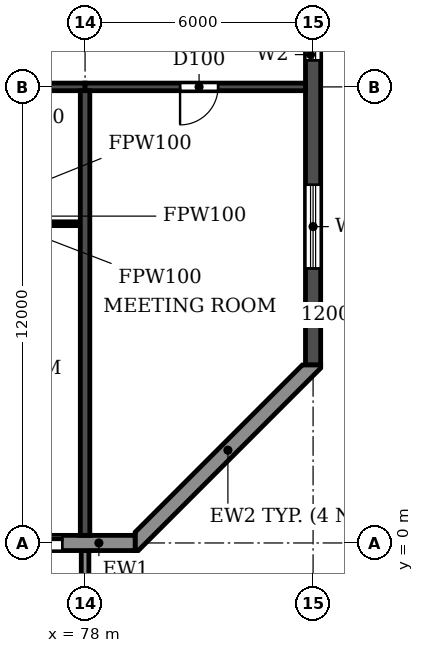
"""IFC4 building model, lengths in metres.
Left out: names, types, materials, properties, quantities, classifications, styles, units other than length and angle.
Written with IfcOpenShell. Run it as: python <this file> out.ifc"""

import sys

from ifc_helpers import new_model, si_unit, direction, frame, frame_2d, origin, place, context, subcontext, project, spatial, polyline, rectangle, outline, extrude, source, transform, mapped, element, fill, save


model = new_model("IFC4")
c1 = context("Model", 3, precision=1e-05, world=origin(), true_north=direction((0.0, 1.0)))
c2 = subcontext(c1, "Body", "Model", "MODEL_VIEW")
j1 = project(units=[si_unit("LENGTHUNIT", "METRE"), si_unit("PLANEANGLEUNIT", "RADIAN")], contexts=[c1])
p1 = place(None, origin())
s1 = spatial("IfcSite", under=j1, at=p1, CompositionType="ELEMENT")
p2 = place(p1, origin())
s2 = spatial("IfcBuilding", under=s1, at=p2, CompositionType="ELEMENT")
p3 = place(p2, frame((0.0, 0.0, 241.2)))
s3 = spatial("IfcBuildingStorey", under=s2, at=p3, CompositionType="ELEMENT", Elevation=241.2)
p4 = place(p3, frame((78.0, 0.2, 0.0), z_axis=(0.0, 0.0, 1.0), x_axis=(0.0, 1.0, 0.0)))
e1 = element("IfcWall", 1, at=p4, inside=s3, PredefinedType="SHEAR", context=c2, shape_type="SweptSolid", body=[
    extrude(rectangle(XDim=11.7, YDim=0.25, at=frame_2d((5.85, 0.0))), origin(), (0.0, 0.0, 1.0), 3.08),
])
p5 = place(p3, frame((84.0, 4.683, 0.0), z_axis=(0.0, 0.0, 1.0), x_axis=(0.0, 1.0, 0.0)))
e2 = element("IfcWall", 2, at=p5, inside=s3, PredefinedType="SHEAR", context=c2, shape_type="SweptSolid", body=[
    extrude(rectangle(XDim=31.834, YDim=0.4, at=frame_2d((15.917, 0.0))), origin(), (0.0, 0.0, 1.0), 3.08),
])
p6 = place(p5, frame((23.817, 0.0, 0.9)))
e3 = element("IfcOpeningElement", 3, at=p6, cuts=e2, PredefinedType="OPENING", context=c2, shape_type="SweptSolid", body=[
    extrude(rectangle(XDim=1.2, YDim=1.5, at=frame_2d((0.6, 0.75))), frame((0.0, 0.21, 0.0), z_axis=(0.0, -1.0, 0.0), x_axis=(1.0, 0.0, 0.0)), (0.0, 0.0, 1.0), 0.42),
])
p7 = place(p5, frame((8.017, 0.0, 0.9)))
e4 = element("IfcOpeningElement", 4, at=p7, cuts=e2, PredefinedType="OPENING", context=c2, shape_type="SweptSolid", body=[
    extrude(rectangle(XDim=1.2, YDim=1.5, at=frame_2d((0.6, 0.75))), frame((0.0, 0.21, 0.0), z_axis=(0.0, -1.0, 0.0), x_axis=(1.0, 0.0, 0.0)), (0.0, 0.0, 1.0), 0.42),
])
p8 = place(p5, frame((27.694, 0.0, 0.6)))
e5 = element("IfcOpeningElement", 5, at=p8, cuts=e2, PredefinedType="OPENING", context=c2, shape_type="SweptSolid", body=[
    extrude(rectangle(XDim=2.2, YDim=1.8, at=frame_2d((1.1, 0.9))), frame((0.0, 0.21, 0.0), z_axis=(0.0, -1.0, 0.0), x_axis=(1.0, 0.0, 0.0)), (0.0, 0.0, 1.0), 0.42),
])
p9 = place(p5, frame((2.541, 0.0, 0.6)))
e6 = element("IfcOpeningElement", 6, at=p9, cuts=e2, PredefinedType="OPENING", context=c2, shape_type="SweptSolid", body=[
    extrude(rectangle(XDim=2.2, YDim=1.8, at=frame_2d((1.1, 0.9))), frame((0.0, 0.21, 0.0), z_axis=(0.0, -1.0, 0.0), x_axis=(1.0, 0.0, 0.0)), (0.0, 0.0, 1.0), 0.42),
])
p10 = place(p5, frame((15.917, 0.0, 0.9)))
e7 = element("IfcOpeningElement", 7, at=p10, cuts=e2, PredefinedType="OPENING", context=c2, shape_type="SweptSolid", body=[
    extrude(rectangle(XDim=1.2, YDim=1.5, at=frame_2d((0.6, 0.75))), frame((0.0, 0.21, 0.0), z_axis=(0.0, -1.0, 0.0), x_axis=(1.0, 0.0, 0.0)), (0.0, 0.0, 1.0), 0.42),
])
p11 = place(p3, frame((72.0, 12.0, 0.0), z_axis=(0.0, 0.0, 1.0), x_axis=(1.0, 0.0, 0.0)))
e8 = element("IfcWall", 8, at=p11, inside=s3, PredefinedType="SHEAR", context=c2, shape_type="SweptSolid", body=[
    extrude(rectangle(XDim=6.0, YDim=0.2, at=frame_2d((3.0, 0.0))), origin(), (0.0, 0.0, 1.0), 2.48),
])
p12 = place(p11, frame((2.55, 0.0, 0.0)))
e9 = element("IfcOpeningElement", 9, at=p12, cuts=e8, PredefinedType="OPENING", context=c2, shape_type="SweptSolid", body=[
    extrude(rectangle(XDim=1.0, YDim=2.1, at=frame_2d((0.5, 1.05))), frame((0.0, 0.11, 0.0), z_axis=(0.0, -1.0, 0.0), x_axis=(1.0, 0.0, 0.0)), (0.0, 0.0, 1.0), 0.22),
])
p13 = place(p3, frame((78.0, 12.0, 0.0), z_axis=(0.0, 0.0, 1.0), x_axis=(1.0, 0.0, 0.0)))
e10 = element("IfcWall", 10, at=p13, inside=s3, PredefinedType="SHEAR", context=c2, shape_type="SweptSolid", body=[
    extrude(rectangle(XDim=5.8, YDim=0.2, at=frame_2d((2.9, 0.0))), origin(), (0.0, 0.0, 1.0), 2.48),
])
p14 = place(p13, frame((2.5, 0.0, 0.0)))
e11 = element("IfcOpeningElement", 11, at=p14, cuts=e10, PredefinedType="OPENING", context=c2, shape_type="SweptSolid", body=[
    extrude(rectangle(XDim=1.0, YDim=2.1, at=frame_2d((0.5, 1.05))), frame((0.0, 0.11, 0.0), z_axis=(0.0, -1.0, 0.0), x_axis=(1.0, 0.0, 0.0)), (0.0, 0.0, 1.0), 0.22),
])
p15 = place(p3, frame((22.683, 0.0, 0.0), z_axis=(0.0, 0.0, 1.0), x_axis=(1.0, 0.0, 0.0)))
e12 = element("IfcWall", 12, at=p15, inside=s3, PredefinedType="STANDARD", context=c2, shape_type="SweptSolid", body=[
    extrude(rectangle(XDim=56.634, YDim=0.4, at=frame_2d((28.317, 0.0))), origin(), (0.0, 0.0, 1.0), 3.08),
])
p16 = place(p15, frame((1.717, 0.0, 0.9)))
e13 = element("IfcOpeningElement", 13, at=p16, cuts=e12, PredefinedType="OPENING", context=c2, shape_type="SweptSolid", body=[
    extrude(rectangle(XDim=2.2, YDim=1.5, at=frame_2d((1.1, 0.75))), frame((0.0, 0.21, 0.0), z_axis=(0.0, -1.0, 0.0), x_axis=(1.0, 0.0, 0.0)), (0.0, 0.0, 1.0), 0.42),
])
p17 = place(p15, frame((4.917, 0.0, 0.0)))
e14 = element("IfcOpeningElement", 14, at=p17, cuts=e12, PredefinedType="OPENING", context=c2, shape_type="SweptSolid", body=[
    extrude(rectangle(XDim=1.8, YDim=2.4, at=frame_2d((0.9, 1.2))), frame((0.0, 0.21, 0.0), z_axis=(0.0, -1.0, 0.0), x_axis=(1.0, 0.0, 0.0)), (0.0, 0.0, 1.0), 0.42),
])
p18 = place(p15, frame((7.717, 0.0, 0.9)))
e15 = element("IfcOpeningElement", 15, at=p18, cuts=e12, PredefinedType="OPENING", context=c2, shape_type="SweptSolid", body=[
    extrude(rectangle(XDim=2.2, YDim=1.5, at=frame_2d((1.1, 0.75))), frame((0.0, 0.21, 0.0), z_axis=(0.0, -1.0, 0.0), x_axis=(1.0, 0.0, 0.0)), (0.0, 0.0, 1.0), 0.42),
])
p19 = place(p15, frame((10.717, 0.0, 0.9)))
e16 = element("IfcOpeningElement", 16, at=p19, cuts=e12, PredefinedType="OPENING", context=c2, shape_type="SweptSolid", body=[
    extrude(rectangle(XDim=2.2, YDim=1.5, at=frame_2d((1.1, 0.75))), frame((0.0, 0.21, 0.0), z_axis=(0.0, -1.0, 0.0), x_axis=(1.0, 0.0, 0.0)), (0.0, 0.0, 1.0), 0.42),
])
p20 = place(p15, frame((13.717, 0.0, 0.9)))
e17 = element("IfcOpeningElement", 17, at=p20, cuts=e12, PredefinedType="OPENING", context=c2, shape_type="SweptSolid", body=[
    extrude(rectangle(XDim=2.2, YDim=1.5, at=frame_2d((1.1, 0.75))), frame((0.0, 0.21, 0.0), z_axis=(0.0, -1.0, 0.0), x_axis=(1.0, 0.0, 0.0)), (0.0, 0.0, 1.0), 0.42),
])
p21 = place(p15, frame((16.917, 0.0, 0.0)))
e18 = element("IfcOpeningElement", 18, at=p21, cuts=e12, PredefinedType="OPENING", context=c2, shape_type="SweptSolid", body=[
    extrude(rectangle(XDim=1.8, YDim=2.4, at=frame_2d((0.9, 1.2))), frame((0.0, 0.21, 0.0), z_axis=(0.0, -1.0, 0.0), x_axis=(1.0, 0.0, 0.0)), (0.0, 0.0, 1.0), 0.42),
])
p22 = place(p15, frame((19.717, 0.0, 0.9)))
e19 = element("IfcOpeningElement", 19, at=p22, cuts=e12, PredefinedType="OPENING", context=c2, shape_type="SweptSolid", body=[
    extrude(rectangle(XDim=2.2, YDim=1.5, at=frame_2d((1.1, 0.75))), frame((0.0, 0.21, 0.0), z_axis=(0.0, -1.0, 0.0), x_axis=(1.0, 0.0, 0.0)), (0.0, 0.0, 1.0), 0.42),
])
p23 = place(p15, frame((22.717, 0.0, 0.9)))
e20 = element("IfcOpeningElement", 20, at=p23, cuts=e12, PredefinedType="OPENING", context=c2, shape_type="SweptSolid", body=[
    extrude(rectangle(XDim=2.2, YDim=1.5, at=frame_2d((1.1, 0.75))), frame((0.0, 0.21, 0.0), z_axis=(0.0, -1.0, 0.0), x_axis=(1.0, 0.0, 0.0)), (0.0, 0.0, 1.0), 0.42),
])
p24 = place(p15, frame((25.717, 0.0, 0.9)))
e21 = element("IfcOpeningElement", 21, at=p24, cuts=e12, PredefinedType="OPENING", context=c2, shape_type="SweptSolid", body=[
    extrude(rectangle(XDim=2.2, YDim=1.5, at=frame_2d((1.1, 0.75))), frame((0.0, 0.21, 0.0), z_axis=(0.0, -1.0, 0.0), x_axis=(1.0, 0.0, 0.0)), (0.0, 0.0, 1.0), 0.42),
])
p25 = place(p15, frame((28.717, 0.0, 0.9)))
e22 = element("IfcOpeningElement", 22, at=p25, cuts=e12, PredefinedType="OPENING", context=c2, shape_type="SweptSolid", body=[
    extrude(rectangle(XDim=2.2, YDim=1.5, at=frame_2d((1.1, 0.75))), frame((0.0, 0.21, 0.0), z_axis=(0.0, -1.0, 0.0), x_axis=(1.0, 0.0, 0.0)), (0.0, 0.0, 1.0), 0.42),
])
p26 = place(p15, frame((31.717, 0.0, 0.9)))
e23 = element("IfcOpeningElement", 23, at=p26, cuts=e12, PredefinedType="OPENING", context=c2, shape_type="SweptSolid", body=[
    extrude(rectangle(XDim=2.2, YDim=1.5, at=frame_2d((1.1, 0.75))), frame((0.0, 0.21, 0.0), z_axis=(0.0, -1.0, 0.0), x_axis=(1.0, 0.0, 0.0)), (0.0, 0.0, 1.0), 0.42),
])
p27 = place(p15, frame((34.717, 0.0, 0.9)))
e24 = element("IfcOpeningElement", 24, at=p27, cuts=e12, PredefinedType="OPENING", context=c2, shape_type="SweptSolid", body=[
    extrude(rectangle(XDim=2.2, YDim=1.5, at=frame_2d((1.1, 0.75))), frame((0.0, 0.21, 0.0), z_axis=(0.0, -1.0, 0.0), x_axis=(1.0, 0.0, 0.0)), (0.0, 0.0, 1.0), 0.42),
])
p28 = place(p15, frame((37.917, 0.0, 0.0)))
e25 = element("IfcOpeningElement", 25, at=p28, cuts=e12, PredefinedType="OPENING", context=c2, shape_type="SweptSolid", body=[
    extrude(rectangle(XDim=1.8, YDim=2.4, at=frame_2d((0.9, 1.2))), frame((0.0, 0.21, 0.0), z_axis=(0.0, -1.0, 0.0), x_axis=(1.0, 0.0, 0.0)), (0.0, 0.0, 1.0), 0.42),
])
p29 = place(p15, frame((40.717, 0.0, 0.9)))
e26 = element("IfcOpeningElement", 26, at=p29, cuts=e12, PredefinedType="OPENING", context=c2, shape_type="SweptSolid", body=[
    extrude(rectangle(XDim=2.2, YDim=1.5, at=frame_2d((1.1, 0.75))), frame((0.0, 0.21, 0.0), z_axis=(0.0, -1.0, 0.0), x_axis=(1.0, 0.0, 0.0)), (0.0, 0.0, 1.0), 0.42),
])
p30 = place(p15, frame((43.717, 0.0, 0.9)))
e27 = element("IfcOpeningElement", 27, at=p30, cuts=e12, PredefinedType="OPENING", context=c2, shape_type="SweptSolid", body=[
    extrude(rectangle(XDim=2.2, YDim=1.5, at=frame_2d((1.1, 0.75))), frame((0.0, 0.21, 0.0), z_axis=(0.0, -1.0, 0.0), x_axis=(1.0, 0.0, 0.0)), (0.0, 0.0, 1.0), 0.42),
])
p31 = place(p15, frame((46.717, 0.0, 0.9)))
e28 = element("IfcOpeningElement", 28, at=p31, cuts=e12, PredefinedType="OPENING", context=c2, shape_type="SweptSolid", body=[
    extrude(rectangle(XDim=2.2, YDim=1.5, at=frame_2d((1.1, 0.75))), frame((0.0, 0.21, 0.0), z_axis=(0.0, -1.0, 0.0), x_axis=(1.0, 0.0, 0.0)), (0.0, 0.0, 1.0), 0.42),
])
p32 = place(p15, frame((49.717, 0.0, 0.9)))
e29 = element("IfcOpeningElement", 29, at=p32, cuts=e12, PredefinedType="OPENING", context=c2, shape_type="SweptSolid", body=[
    extrude(rectangle(XDim=2.2, YDim=1.5, at=frame_2d((1.1, 0.75))), frame((0.0, 0.21, 0.0), z_axis=(0.0, -1.0, 0.0), x_axis=(1.0, 0.0, 0.0)), (0.0, 0.0, 1.0), 0.42),
])
p33 = place(p15, frame((52.917, 0.0, 0.0)))
e30 = element("IfcOpeningElement", 30, at=p33, cuts=e12, PredefinedType="OPENING", context=c2, shape_type="SweptSolid", body=[
    extrude(rectangle(XDim=1.8, YDim=2.4, at=frame_2d((0.9, 1.2))), frame((0.0, 0.21, 0.0), z_axis=(0.0, -1.0, 0.0), x_axis=(1.0, 0.0, 0.0)), (0.0, 0.0, 1.0), 0.42),
])
p34 = place(p3, origin())
e31 = element("IfcWall", 31, at=p34, inside=s3, PredefinedType="STANDARD", context=c2, shape_type="SweptSolid", body=[
    extrude(outline(polyline([(79.317, -0.2), (79.4, -0.2), (84.2, 4.6), (84.2, 4.683), (83.717, 4.683), (79.317, 0.283), (79.317, -0.2)])), origin(), (0.0, 0.0, 1.0), 3.08),
])
m1 = source(origin(), c2, "Body", "SweptSolid", [
    extrude(outline(polyline([(0.0, 0.0), (0.2, 0.0), (0.2, 1.65), (0.0, 1.65), (0.0, 0.0)])), origin(), (0.0, 0.0, 1.0), 3.1),
])
p35 = place(p3, frame((77.9, -1.85, 0.0)))
e32 = element("IfcWall", 32, at=p35, inside=s3, PredefinedType="STANDARD", context=c2, shape_type="MappedRepresentation", body=[
    mapped(m1, transform((0.0, 0.0, 0.0))),
])
p36 = place(p3, frame((75.9, 8.4, 0.0), z_axis=(0.0, 0.0, 1.0), x_axis=(1.0, 0.0, 0.0)))
e33 = element("IfcWall", 33, at=p36, inside=s3, PredefinedType="PARTITIONING", context=c2, shape_type="SweptSolid", body=[
    extrude(rectangle(XDim=1.965, YDim=0.1, at=frame_2d((0.982, 0.0))), origin(), (0.0, 0.0, 1.0), 3.08),
])
p37 = place(p33, origin())
e34 = element("IfcDoor", 34, at=p37, inside=s3, OperationType="DOUBLE_DOOR_SLIDING", PredefinedType="DOOR", context=c2, shape_type="SweptSolid", body=[
    extrude(rectangle(XDim=1.8, YDim=2.4, at=frame_2d((0.9, 1.2))), frame((0.0, 0.025, 0.0), z_axis=(0.0, -1.0, 0.0), x_axis=(1.0, 0.0, 0.0)), (0.0, 0.0, 1.0), 0.05),
])
fill(e30, e34)
p38 = place(p7, origin())
e35 = element("IfcWindow", 35, at=p38, inside=s3, PartitioningType="SINGLE_PANEL", PredefinedType="WINDOW", context=c2, shape_type="SweptSolid", body=[
    extrude(rectangle(XDim=1.2, YDim=1.5, at=frame_2d((0.6, 0.75))), frame((0.0, 0.03, 0.0), z_axis=(0.0, -1.0, 0.0), x_axis=(1.0, 0.0, 0.0)), (0.0, 0.0, 1.0), 0.06),
])
fill(e4, e35)
p39 = place(p9, origin())
e36 = element("IfcWindow", 36, at=p39, inside=s3, PartitioningType="DOUBLE_PANEL_HORIZONTAL", PredefinedType="WINDOW", context=c2, shape_type="SweptSolid", body=[
    extrude(rectangle(XDim=2.2, YDim=1.8, at=frame_2d((1.1, 0.9))), frame((0.0, 0.03, 0.0), z_axis=(0.0, -1.0, 0.0), x_axis=(1.0, 0.0, 0.0)), (0.0, 0.0, 1.0), 0.06),
])
fill(e6, e36)
p40 = place(p14, frame((1.0, 0.0, 0.0), z_axis=(0.0, 0.0, 1.0), x_axis=(-1.0, 0.0, 0.0)))
e37 = element("IfcDoor", 37, at=p40, inside=s3, OperationType="SINGLE_SWING_RIGHT", PredefinedType="DOOR", context=c2, shape_type="SweptSolid", body=[
    extrude(rectangle(XDim=1.0, YDim=2.1, at=frame_2d((0.5, 1.05))), frame((0.0, 0.025, 0.0), z_axis=(0.0, -1.0, 0.0), x_axis=(1.0, 0.0, 0.0)), (0.0, 0.0, 1.0), 0.05),
])
fill(e11, e37)
save(model, sys.argv[1])
